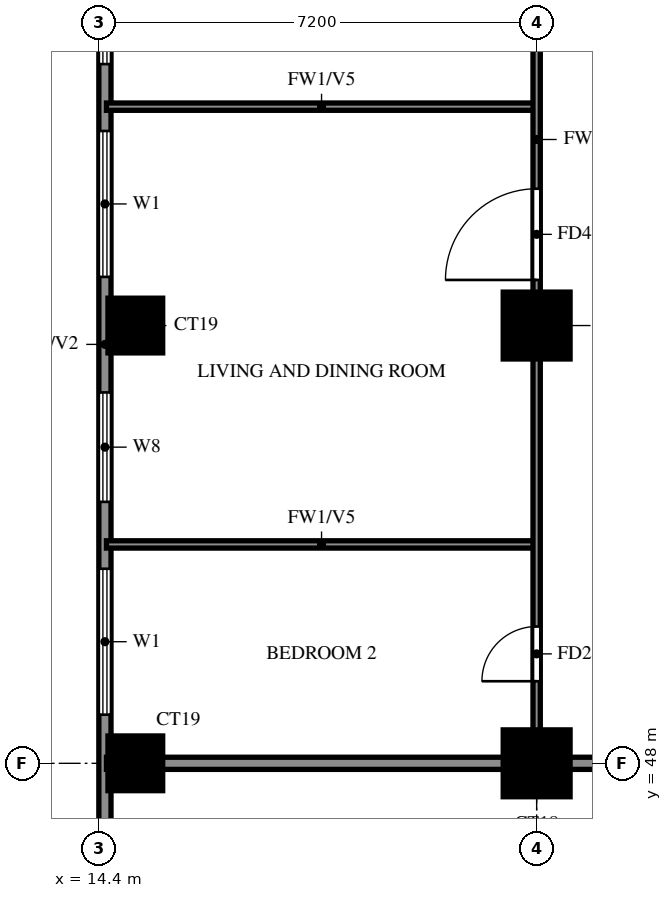
"""IFC4 building model, lengths in metres.
Left out: names, types, materials, properties, quantities, classifications, styles, units other than length and angle.
Written with IfcOpenShell. Run it as: python <this file> out.ifc"""

import sys

from ifc_helpers import new_model, si_unit, direction, frame, frame_2d, origin, origin_2d, place, context, subcontext, project, spatial, rectangle, extrude, source, transform, mapped, element, fill, save


model = new_model("IFC4")
c1 = context("Model", 3, precision=1e-05, world=origin(), true_north=direction((0.0, 1.0)))
c2 = subcontext(c1, "Body", "Model", "MODEL_VIEW")
j1 = project(units=[si_unit("LENGTHUNIT", "METRE"), si_unit("PLANEANGLEUNIT", "RADIAN")], contexts=[c1])
p1 = place(None, origin())
s1 = spatial("IfcSite", under=j1, at=p1, CompositionType="ELEMENT")
p2 = place(p1, origin())
s2 = spatial("IfcBuilding", under=s1, at=p2, CompositionType="ELEMENT")
p3 = place(p2, frame((0.0, 0.0, 113.0)))
s3 = spatial("IfcBuildingStorey", under=s2, at=p3, CompositionType="ELEMENT", Elevation=113.0)
m1 = source(origin(), c2, "Body", "SweptSolid", [
    extrude(rectangle(XDim=0.9, YDim=0.9, at=origin_2d()), origin(), (0.0, 0.0, 1.0), 3.2),
])
p4 = place(p3, frame((15.0, 48.0, 0.0), z_axis=(0.0, 0.0, 1.0), x_axis=(1.0, 0.0, 0.0)))
e1 = element("IfcColumn", 1, at=p4, inside=s3, PredefinedType="COLUMN", context=c2, shape_type="MappedRepresentation", body=[
    mapped(m1, transform((0.0, 0.0, 0.0))),
])
m2 = source(origin(), c2, "Body", "SweptSolid", [
    extrude(rectangle(XDim=1.1, YDim=1.1, at=origin_2d()), origin(), (0.0, 0.0, 1.0), 3.2),
])
p5 = place(p3, frame((21.6, 48.0, 0.0), z_axis=(0.0, 0.0, 1.0), x_axis=(1.0, 0.0, 0.0)))
e2 = element("IfcColumn", 2, at=p5, inside=s3, PredefinedType="COLUMN", context=c2, shape_type="MappedRepresentation", body=[
    mapped(m2, transform((0.0, 0.0, 0.0))),
])
p6 = place(p3, frame((15.0, 55.2, 0.0), z_axis=(0.0, 0.0, 1.0), x_axis=(1.0, 0.0, 0.0)))
e3 = element("IfcColumn", 3, at=p6, inside=s3, PredefinedType="COLUMN", context=c2, shape_type="MappedRepresentation", body=[
    mapped(m1, transform((0.0, 0.0, 0.0))),
])
p7 = place(p3, frame((21.6, 55.2, 0.0), z_axis=(0.0, 0.0, 1.0), x_axis=(1.0, 0.0, 0.0)))
e4 = element("IfcColumn", 4, at=p7, inside=s3, PredefinedType="COLUMN", context=c2, shape_type="MappedRepresentation", body=[
    mapped(m2, transform((0.0, 0.0, 0.0))),
])
p8 = place(p3, frame((14.5, 76.6, 0.0), z_axis=(0.0, 0.0, 1.0), x_axis=(0.0, -1.0, 0.0)))
e5 = element("IfcWall", 5, at=p8, inside=s3, PredefinedType="SOLIDWALL", context=c2, shape_type="SweptSolid", body=[
    extrude(rectangle(XDim=33.4, YDim=0.2, at=frame_2d((16.7, 0.0))), origin(), (0.0, 0.0, 1.0), 3.2),
])
p9 = place(p8, frame((29.9, 0.0, 0.6)))
e6 = element("IfcOpeningElement", 6, at=p9, cuts=e5, PredefinedType="OPENING", context=c2, shape_type="SweptSolid", body=[
    extrude(rectangle(XDim=2.4, YDim=2.4, at=frame_2d((1.2, 1.2))), frame((0.0, 0.11, 0.0), z_axis=(0.0, -1.0, 0.0), x_axis=(1.0, 0.0, 0.0)), (0.0, 0.0, 1.0), 0.22),
])
p10 = place(p8, frame((25.4, 0.0, 0.6)))
e7 = element("IfcOpeningElement", 7, at=p10, cuts=e5, PredefinedType="OPENING", context=c2, shape_type="SweptSolid", body=[
    extrude(rectangle(XDim=2.4, YDim=2.4, at=frame_2d((1.2, 1.2))), frame((0.0, 0.11, 0.0), z_axis=(0.0, -1.0, 0.0), x_axis=(1.0, 0.0, 0.0)), (0.0, 0.0, 1.0), 0.22),
])
p11 = place(p8, frame((18.2, 0.0, 0.6)))
e8 = element("IfcOpeningElement", 8, at=p11, cuts=e5, PredefinedType="OPENING", context=c2, shape_type="SweptSolid", body=[
    extrude(rectangle(XDim=2.4, YDim=2.4, at=frame_2d((1.2, 1.2))), frame((0.0, 0.11, 0.0), z_axis=(0.0, -1.0, 0.0), x_axis=(1.0, 0.0, 0.0)), (0.0, 0.0, 1.0), 0.22),
])
p12 = place(p8, frame((22.5, 0.0, 0.6)))
e9 = element("IfcOpeningElement", 9, at=p12, cuts=e5, PredefinedType="OPENING", context=c2, shape_type="SweptSolid", body=[
    extrude(rectangle(XDim=1.8, YDim=2.4, at=frame_2d((0.9, 1.2))), frame((0.0, 0.11, 0.0), z_axis=(0.0, -1.0, 0.0), x_axis=(1.0, 0.0, 0.0)), (0.0, 0.0, 1.0), 0.22),
])
p13 = place(p8, frame((15.3, 0.0, 0.6)))
e10 = element("IfcOpeningElement", 10, at=p13, cuts=e5, PredefinedType="OPENING", context=c2, shape_type="SweptSolid", body=[
    extrude(rectangle(XDim=1.8, YDim=2.4, at=frame_2d((0.9, 1.2))), frame((0.0, 0.11, 0.0), z_axis=(0.0, -1.0, 0.0), x_axis=(1.0, 0.0, 0.0)), (0.0, 0.0, 1.0), 0.22),
])
p14 = place(p8, frame((11.0, 0.0, 0.6)))
e11 = element("IfcOpeningElement", 11, at=p14, cuts=e5, PredefinedType="OPENING", context=c2, shape_type="SweptSolid", body=[
    extrude(rectangle(XDim=2.4, YDim=2.4, at=frame_2d((1.2, 1.2))), frame((0.0, 0.11, 0.0), z_axis=(0.0, -1.0, 0.0), x_axis=(1.0, 0.0, 0.0)), (0.0, 0.0, 1.0), 0.22),
])
p15 = place(p8, frame((7.8, 0.0, 0.6)))
e12 = element("IfcOpeningElement", 12, at=p15, cuts=e5, PredefinedType="OPENING", context=c2, shape_type="SweptSolid", body=[
    extrude(rectangle(XDim=2.4, YDim=2.4, at=frame_2d((1.2, 1.2))), frame((0.0, 0.11, 0.0), z_axis=(0.0, -1.0, 0.0), x_axis=(1.0, 0.0, 0.0)), (0.0, 0.0, 1.0), 0.22),
])
p16 = place(p8, frame((4.55, 0.0, 1.5)))
e13 = element("IfcOpeningElement", 13, at=p16, cuts=e5, PredefinedType="OPENING", context=c2, shape_type="SweptSolid", body=[
    extrude(rectangle(XDim=0.9, YDim=0.9, at=frame_2d((0.45, 0.45))), frame((0.0, 0.11, 0.0), z_axis=(0.0, -1.0, 0.0), x_axis=(1.0, 0.0, 0.0)), (0.0, 0.0, 1.0), 0.22),
])
p17 = place(p8, frame((0.6, 0.0, 0.6)))
e14 = element("IfcOpeningElement", 14, at=p17, cuts=e5, PredefinedType="OPENING", context=c2, shape_type="SweptSolid", body=[
    extrude(rectangle(XDim=2.4, YDim=2.4, at=frame_2d((1.2, 1.2))), frame((0.0, 0.11, 0.0), z_axis=(0.0, -1.0, 0.0), x_axis=(1.0, 0.0, 0.0)), (0.0, 0.0, 1.0), 0.22),
])
p18 = place(p3, frame((14.525, 48.0, 0.0), z_axis=(0.0, 0.0, 1.0), x_axis=(1.0, 0.0, 0.0)))
e15 = element("IfcWall", 15, at=p18, inside=s3, PredefinedType="SOLIDWALL", context=c2, shape_type="SweptSolid", body=[
    extrude(rectangle(XDim=19.075, YDim=0.2, at=frame_2d((9.538, 0.0))), origin(), (0.0, 0.0, 1.0), 3.2),
])
for number, where, z_axis, x_axis in (
    (16, (14.525, 51.6, 0.0), (0.0, 0.0, 1.0), (1.0, 0.0, 0.0)),
    (17, (14.525, 58.8, 0.0), (0.0, 0.0, 1.0), (1.0, 0.0, 0.0)),
):
    element("IfcWall", number, at=place(p3, frame(where, z_axis=z_axis, x_axis=x_axis)), inside=s3, PredefinedType="PARTITIONING", context=c2, shape_type="SweptSolid", body=[
        extrude(rectangle(XDim=7.075, YDim=0.12, at=frame_2d((3.538, 0.0))), origin(), (0.0, 0.0, 1.0), 2.3),
    ])
p19 = place(p3, frame((21.6, 48.0, 0.0), z_axis=(0.0, 0.0, 1.0), x_axis=(0.0, 1.0, 0.0)))
e18 = element("IfcWall", 18, at=p19, inside=s3, PredefinedType="PARTITIONING", context=c2, shape_type="SweptSolid", body=[
    extrude(rectangle(XDim=21.6, YDim=0.12, at=frame_2d((10.8, 0.0))), origin(), (0.0, 0.0, 1.0), 3.2),
])
p20 = place(p19, frame((1.35, 0.0, 0.0)))
e19 = element("IfcOpeningElement", 19, at=p20, cuts=e18, PredefinedType="OPENING", context=c2, shape_type="SweptSolid", body=[
    extrude(rectangle(XDim=0.9, YDim=2.1, at=frame_2d((0.45, 1.05))), frame((0.0, 0.07, 0.0), z_axis=(0.0, -1.0, 0.0), x_axis=(1.0, 0.0, 0.0)), (0.0, 0.0, 1.0), 0.14),
])
p21 = place(p19, frame((7.95, 0.0, 0.0)))
e20 = element("IfcOpeningElement", 20, at=p21, cuts=e18, PredefinedType="OPENING", context=c2, shape_type="SweptSolid", body=[
    extrude(rectangle(XDim=1.5, YDim=2.1, at=frame_2d((0.75, 1.05))), frame((0.0, 0.07, 0.0), z_axis=(0.0, -1.0, 0.0), x_axis=(1.0, 0.0, 0.0)), (0.0, 0.0, 1.0), 0.14),
])
p22 = place(p19, frame((12.15, 0.0, 0.0)))
e21 = element("IfcOpeningElement", 21, at=p22, cuts=e18, PredefinedType="OPENING", context=c2, shape_type="SweptSolid", body=[
    extrude(rectangle(XDim=0.9, YDim=2.1, at=frame_2d((0.45, 1.05))), frame((0.0, 0.07, 0.0), z_axis=(0.0, -1.0, 0.0), x_axis=(1.0, 0.0, 0.0)), (0.0, 0.0, 1.0), 0.14),
])
p23 = place(p19, frame((15.75, 0.0, 0.0)))
e22 = element("IfcOpeningElement", 22, at=p23, cuts=e18, PredefinedType="OPENING", context=c2, shape_type="SweptSolid", body=[
    extrude(rectangle(XDim=0.9, YDim=2.1, at=frame_2d((0.45, 1.05))), frame((0.0, 0.07, 0.0), z_axis=(0.0, -1.0, 0.0), x_axis=(1.0, 0.0, 0.0)), (0.0, 0.0, 1.0), 0.14),
])
p24 = place(p19, frame((19.35, 0.0, 0.0)))
e23 = element("IfcOpeningElement", 23, at=p24, cuts=e18, PredefinedType="OPENING", context=c2, shape_type="SweptSolid", body=[
    extrude(rectangle(XDim=0.9, YDim=2.1, at=frame_2d((0.45, 1.05))), frame((0.0, 0.07, 0.0), z_axis=(0.0, -1.0, 0.0), x_axis=(1.0, 0.0, 0.0)), (0.0, 0.0, 1.0), 0.14),
])
p25 = place(p10, origin())
e24 = element("IfcWindow", 24, at=p25, inside=s3, PartitioningType="DOUBLE_PANEL_VERTICAL", PredefinedType="WINDOW", context=c2, shape_type="SweptSolid", body=[
    extrude(rectangle(XDim=2.4, YDim=2.4, at=frame_2d((1.2, 1.2))), frame((0.0, 0.03, 0.0), z_axis=(0.0, -1.0, 0.0), x_axis=(1.0, 0.0, 0.0)), (0.0, 0.0, 1.0), 0.06),
])
fill(e7, e24)
p26 = place(p11, origin())
e25 = element("IfcWindow", 25, at=p26, inside=s3, PartitioningType="DOUBLE_PANEL_VERTICAL", PredefinedType="WINDOW", context=c2, shape_type="SweptSolid", body=[
    extrude(rectangle(XDim=2.4, YDim=2.4, at=frame_2d((1.2, 1.2))), frame((0.0, 0.03, 0.0), z_axis=(0.0, -1.0, 0.0), x_axis=(1.0, 0.0, 0.0)), (0.0, 0.0, 1.0), 0.06),
])
fill(e8, e25)
p27 = place(p12, origin())
e26 = element("IfcWindow", 26, at=p27, inside=s3, PartitioningType="DOUBLE_PANEL_VERTICAL", PredefinedType="WINDOW", context=c2, shape_type="SweptSolid", body=[
    extrude(rectangle(XDim=1.8, YDim=2.4, at=frame_2d((0.9, 1.2))), frame((0.0, 0.03, 0.0), z_axis=(0.0, -1.0, 0.0), x_axis=(1.0, 0.0, 0.0)), (0.0, 0.0, 1.0), 0.06),
])
fill(e9, e26)
p28 = place(p13, origin())
e27 = element("IfcWindow", 27, at=p28, inside=s3, PartitioningType="DOUBLE_PANEL_VERTICAL", PredefinedType="WINDOW", context=c2, shape_type="SweptSolid", body=[
    extrude(rectangle(XDim=1.8, YDim=2.4, at=frame_2d((0.9, 1.2))), frame((0.0, 0.03, 0.0), z_axis=(0.0, -1.0, 0.0), x_axis=(1.0, 0.0, 0.0)), (0.0, 0.0, 1.0), 0.06),
])
fill(e10, e27)
p29 = place(p20, origin())
e28 = element("IfcDoor", 28, at=p29, inside=s3, OperationType="SINGLE_SWING_LEFT", PredefinedType="DOOR", context=c2, shape_type="SweptSolid", body=[
    extrude(rectangle(XDim=0.9, YDim=2.1, at=frame_2d((0.45, 1.05))), frame((0.0, 0.025, 0.0), z_axis=(0.0, -1.0, 0.0), x_axis=(1.0, 0.0, 0.0)), (0.0, 0.0, 1.0), 0.05),
])
fill(e19, e28)
p30 = place(p21, origin())
e29 = element("IfcDoor", 29, at=p30, inside=s3, OperationType="SINGLE_SWING_RIGHT", PredefinedType="DOOR", context=c2, shape_type="SweptSolid", body=[
    extrude(rectangle(XDim=1.5, YDim=2.1, at=frame_2d((0.75, 1.05))), frame((0.0, 0.025, 0.0), z_axis=(0.0, -1.0, 0.0), x_axis=(1.0, 0.0, 0.0)), (0.0, 0.0, 1.0), 0.05),
])
fill(e20, e29)
save(model, sys.argv[1])
